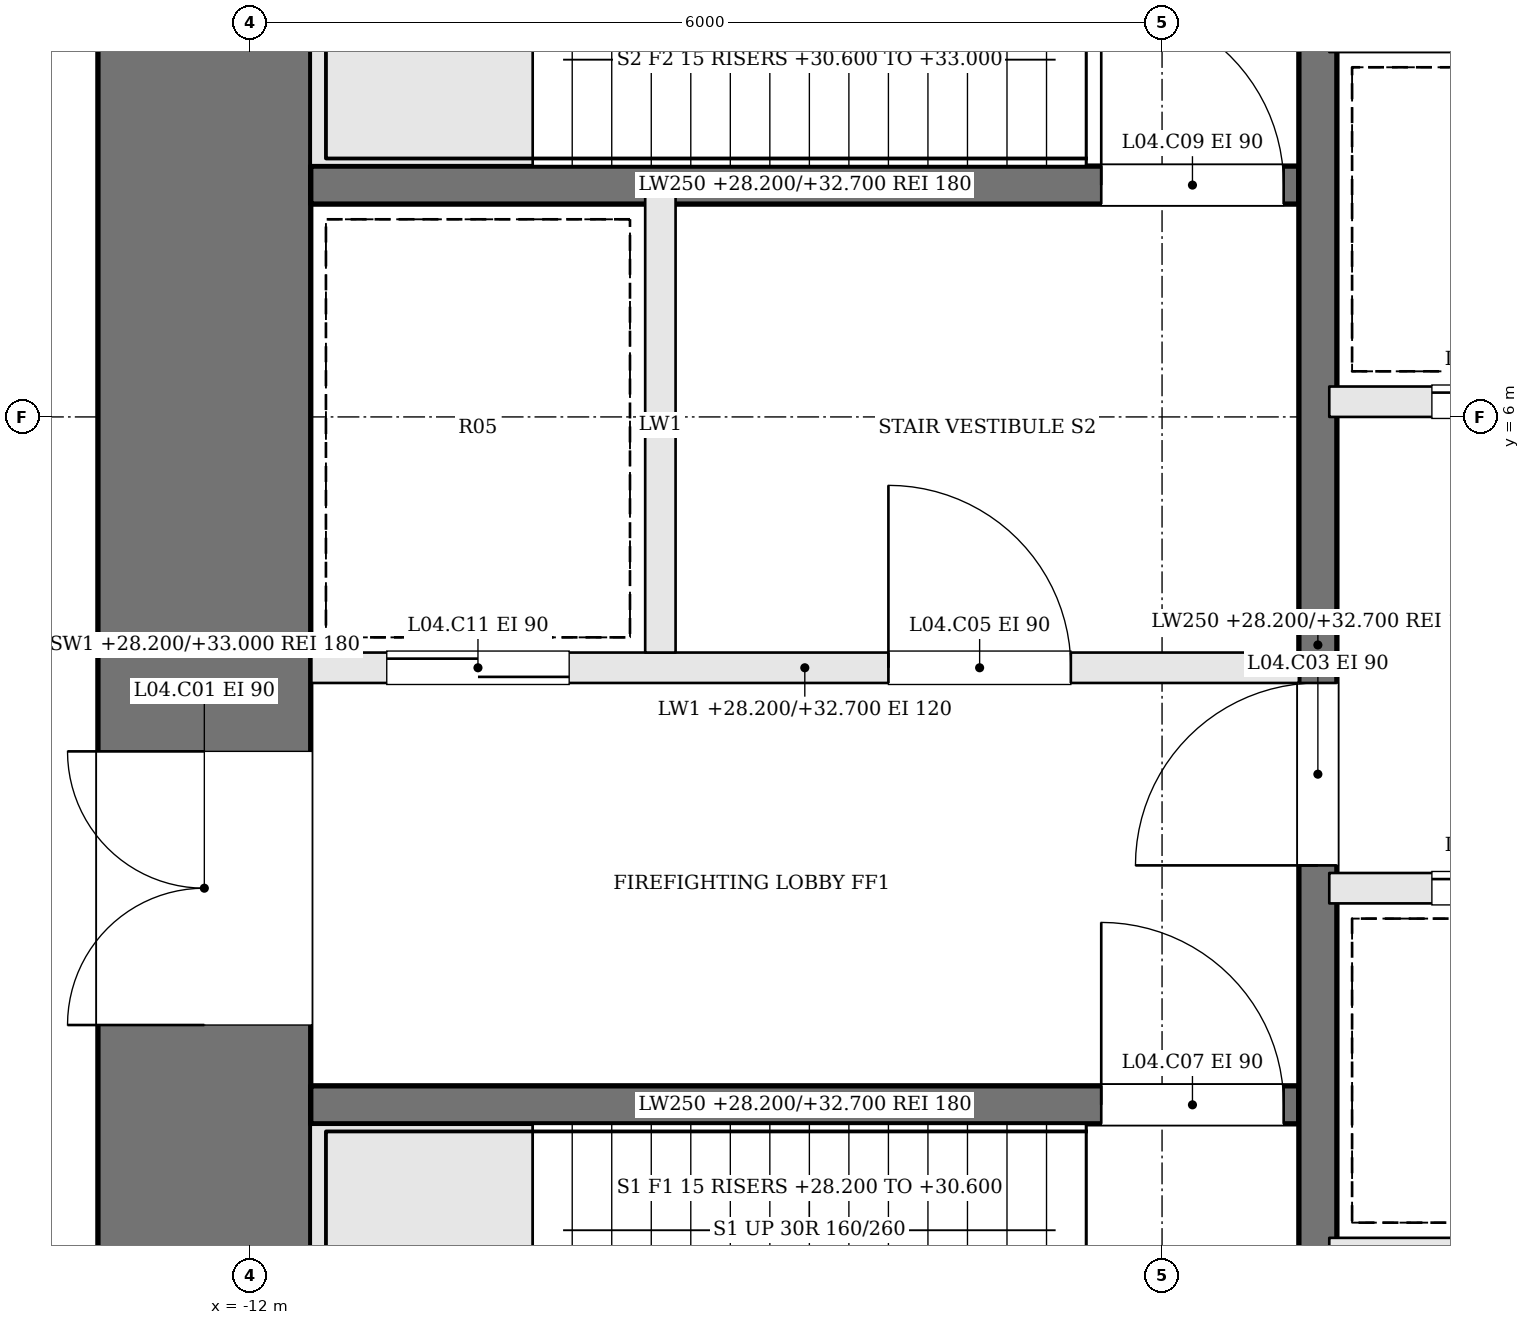
"""IFC4 building model, lengths in metres.
Left out: names, types, materials, properties, quantities, classifications, styles, units other than length and angle.
Written with IfcOpenShell. Run it as: python <this file> out.ifc"""

import sys

from ifc_helpers import new_model, si_unit, direction, frame, frame_2d, origin, place, context, subcontext, project, spatial, rectangle, extrude, element, fill, save


model = new_model("IFC4")
c1 = context("Model", 3, precision=1e-05, world=origin(), true_north=direction((0.0, 1.0)))
c2 = subcontext(c1, "Body", "Model", "MODEL_VIEW")
j1 = project(units=[si_unit("LENGTHUNIT", "METRE"), si_unit("PLANEANGLEUNIT", "RADIAN")], contexts=[c1])
p1 = place(None, origin())
s1 = spatial("IfcSite", under=j1, at=p1, CompositionType="ELEMENT")
p2 = place(p1, origin())
s2 = spatial("IfcBuilding", under=s1, at=p2, CompositionType="ELEMENT")
p3 = place(p2, frame((0.0, 0.0, 28.2)))
s3 = spatial("IfcBuildingStorey", under=s2, at=p3, CompositionType="ELEMENT", Elevation=28.2)
p4 = place(p3, frame((-12.3, -1.6, 0.0), z_axis=(0.0, 0.0, 1.0), x_axis=(0.0, 1.0, 0.0)))
e1 = element("IfcWall", 1, at=p4, inside=s3, PredefinedType="SHEAR", context=c2, shape_type="SweptSolid", body=[
    extrude(rectangle(XDim=12.2, YDim=1.4, at=frame_2d((6.1, 0.0))), origin(), (0.0, 0.0, 1.0), 4.8),
])
p5 = place(p4, frame((3.6, 0.0, 0.0)))
e2 = element("IfcOpeningElement", 2, at=p5, cuts=e1, PredefinedType="OPENING", context=c2, shape_type="SweptSolid", body=[
    extrude(rectangle(XDim=1.8, YDim=2.1, at=frame_2d((0.9, 1.05))), frame((0.0, 0.71, 0.0), z_axis=(0.0, -1.0, 0.0), x_axis=(1.0, 0.0, 0.0)), (0.0, 0.0, 1.0), 1.42),
])
p6 = place(p3, frame((-11.6, 1.475, 0.0), z_axis=(0.0, 0.0, 1.0), x_axis=(1.0, 0.0, 0.0)))
e3 = element("IfcWall", 3, at=p6, inside=s3, PredefinedType="SOLIDWALL", context=c2, shape_type="SweptSolid", body=[
    extrude(rectangle(XDim=6.5, YDim=0.25, at=frame_2d((3.25, 0.0))), origin(), (0.0, 0.0, 1.0), 4.5),
])
p7 = place(p6, frame((5.2, 0.0, 0.0)))
e4 = element("IfcOpeningElement", 4, at=p7, cuts=e3, PredefinedType="OPENING", context=c2, shape_type="SweptSolid", body=[
    extrude(rectangle(XDim=1.2, YDim=2.1, at=frame_2d((0.6, 1.05))), frame((0.0, 0.135, 0.0), z_axis=(0.0, -1.0, 0.0), x_axis=(1.0, 0.0, 0.0)), (0.0, 0.0, 1.0), 0.27),
])
p8 = place(p3, frame((-11.6, 4.35, 0.0), z_axis=(0.0, 0.0, 1.0), x_axis=(1.0, 0.0, 0.0)))
e5 = element("IfcWall", 5, at=p8, inside=s3, PredefinedType="SOLIDWALL", context=c2, shape_type="SweptSolid", body=[
    extrude(rectangle(XDim=6.5, YDim=0.2, at=frame_2d((3.25, 0.0))), origin(), (0.0, 0.0, 1.0), 4.5),
])
p9 = place(p8, frame((3.8, 0.0, 0.0)))
e6 = element("IfcOpeningElement", 6, at=p9, cuts=e5, PredefinedType="OPENING", context=c2, shape_type="SweptSolid", body=[
    extrude(rectangle(XDim=1.2, YDim=2.1, at=frame_2d((0.6, 1.05))), frame((0.0, 0.11, 0.0), z_axis=(0.0, -1.0, 0.0), x_axis=(1.0, 0.0, 0.0)), (0.0, 0.0, 1.0), 0.22),
])
p10 = place(p8, frame((0.5, 0.0, 0.0)))
e7 = element("IfcOpeningElement", 7, at=p10, cuts=e5, PredefinedType="OPENING", context=c2, shape_type="SweptSolid", body=[
    extrude(rectangle(XDim=1.2, YDim=2.1, at=frame_2d((0.6, 1.05))), frame((0.0, 0.11, 0.0), z_axis=(0.0, -1.0, 0.0), x_axis=(1.0, 0.0, 0.0)), (0.0, 0.0, 1.0), 0.22),
])
p11 = place(p3, frame((-11.6, 7.525, 0.0), z_axis=(0.0, 0.0, 1.0), x_axis=(1.0, 0.0, 0.0)))
e8 = element("IfcWall", 8, at=p11, inside=s3, PredefinedType="SOLIDWALL", context=c2, shape_type="SweptSolid", body=[
    extrude(rectangle(XDim=6.5, YDim=0.25, at=frame_2d((3.25, 0.0))), origin(), (0.0, 0.0, 1.0), 4.5),
])
p12 = place(p11, frame((5.2, 0.0, 0.0)))
e9 = element("IfcOpeningElement", 9, at=p12, cuts=e8, PredefinedType="OPENING", context=c2, shape_type="SweptSolid", body=[
    extrude(rectangle(XDim=1.2, YDim=2.1, at=frame_2d((0.6, 1.05))), frame((0.0, 0.135, 0.0), z_axis=(0.0, -1.0, 0.0), x_axis=(1.0, 0.0, 0.0)), (0.0, 0.0, 1.0), 0.27),
])
p13 = place(p3, frame((-9.3, 4.45, 0.0), z_axis=(0.0, 0.0, 1.0), x_axis=(0.0, 1.0, 0.0)))
e10 = element("IfcWall", 10, at=p13, inside=s3, PredefinedType="SOLIDWALL", context=c2, shape_type="SweptSolid", body=[
    extrude(rectangle(XDim=3.0, YDim=0.2, at=frame_2d((1.5, 0.0))), origin(), (0.0, 0.0, 1.0), 4.5),
])
p14 = place(p3, frame((-4.975, -1.6, 0.0), z_axis=(0.0, 0.0, 1.0), x_axis=(0.0, 1.0, 0.0)))
e11 = element("IfcWall", 11, at=p14, inside=s3, PredefinedType="SOLIDWALL", context=c2, shape_type="SweptSolid", body=[
    extrude(rectangle(XDim=12.2, YDim=0.25, at=frame_2d((6.1, 0.0))), origin(), (0.0, 0.0, 1.0), 4.5),
])
p15 = place(p14, frame((4.65, 0.0, 0.0)))
e12 = element("IfcOpeningElement", 12, at=p15, cuts=e11, PredefinedType="OPENING", context=c2, shape_type="SweptSolid", body=[
    extrude(rectangle(XDim=1.2, YDim=2.1, at=frame_2d((0.6, 1.05))), frame((0.0, 0.135, 0.0), z_axis=(0.0, -1.0, 0.0), x_axis=(1.0, 0.0, 0.0)), (0.0, 0.0, 1.0), 0.27),
])
p16 = place(p3, frame((-4.9, 0.5, 0.0), z_axis=(0.0, 0.0, 1.0), x_axis=(1.0, 0.0, 0.0)))
e13 = element("IfcWall", 13, at=p16, inside=s3, PredefinedType="SOLIDWALL", context=c2, shape_type="SweptSolid", body=[
    extrude(rectangle(XDim=9.8, YDim=0.2, at=frame_2d((4.9, 0.0))), origin(), (0.0, 0.0, 1.0), 4.5),
])
p17 = place(p3, frame((-4.9, 2.9, 0.0), z_axis=(0.0, 0.0, 1.0), x_axis=(1.0, 0.0, 0.0)))
e14 = element("IfcWall", 14, at=p17, inside=s3, PredefinedType="SOLIDWALL", context=c2, shape_type="SweptSolid", body=[
    extrude(rectangle(XDim=9.8, YDim=0.2, at=frame_2d((4.9, 0.0))), origin(), (0.0, 0.0, 1.0), 4.5),
])
p18 = place(p17, frame((0.675, 0.0, 0.0)))
e15 = element("IfcOpeningElement", 15, at=p18, cuts=e14, PredefinedType="OPENING", context=c2, shape_type="SweptSolid", body=[
    extrude(rectangle(XDim=1.1, YDim=2.1, at=frame_2d((0.55, 1.05))), frame((0.0, 0.11, 0.0), z_axis=(0.0, -1.0, 0.0), x_axis=(1.0, 0.0, 0.0)), (0.0, 0.0, 1.0), 0.22),
])
p19 = place(p17, frame((3.125, 0.0, 0.0)))
e16 = element("IfcOpeningElement", 16, at=p19, cuts=e14, PredefinedType="OPENING", context=c2, shape_type="SweptSolid", body=[
    extrude(rectangle(XDim=1.1, YDim=2.1, at=frame_2d((0.55, 1.05))), frame((0.0, 0.11, 0.0), z_axis=(0.0, -1.0, 0.0), x_axis=(1.0, 0.0, 0.0)), (0.0, 0.0, 1.0), 0.22),
])
p20 = place(p3, frame((-4.9, 6.1, 0.0), z_axis=(0.0, 0.0, 1.0), x_axis=(1.0, 0.0, 0.0)))
e17 = element("IfcWall", 17, at=p20, inside=s3, PredefinedType="SOLIDWALL", context=c2, shape_type="SweptSolid", body=[
    extrude(rectangle(XDim=9.8, YDim=0.2, at=frame_2d((4.9, 0.0))), origin(), (0.0, 0.0, 1.0), 4.5),
])
p21 = place(p20, frame((0.675, 0.0, 0.0)))
e18 = element("IfcOpeningElement", 18, at=p21, cuts=e17, PredefinedType="OPENING", context=c2, shape_type="SweptSolid", body=[
    extrude(rectangle(XDim=1.1, YDim=2.1, at=frame_2d((0.55, 1.05))), frame((0.0, 0.11, 0.0), z_axis=(0.0, -1.0, 0.0), x_axis=(1.0, 0.0, 0.0)), (0.0, 0.0, 1.0), 0.22),
])
p22 = place(p20, frame((3.125, 0.0, 0.0)))
e19 = element("IfcOpeningElement", 19, at=p22, cuts=e17, PredefinedType="OPENING", context=c2, shape_type="SweptSolid", body=[
    extrude(rectangle(XDim=1.1, YDim=2.1, at=frame_2d((0.55, 1.05))), frame((0.0, 0.11, 0.0), z_axis=(0.0, -1.0, 0.0), x_axis=(1.0, 0.0, 0.0)), (0.0, 0.0, 1.0), 0.22),
])
p23 = place(p20, frame((5.575, 0.0, 0.0)))
e20 = element("IfcOpeningElement", 20, at=p23, cuts=e17, PredefinedType="OPENING", context=c2, shape_type="SweptSolid", body=[
    extrude(rectangle(XDim=1.1, YDim=2.1, at=frame_2d((0.55, 1.05))), frame((0.0, 0.11, 0.0), z_axis=(0.0, -1.0, 0.0), x_axis=(1.0, 0.0, 0.0)), (0.0, 0.0, 1.0), 0.22),
])
p24 = place(p20, frame((8.025, 0.0, 0.0)))
e21 = element("IfcOpeningElement", 21, at=p24, cuts=e17, PredefinedType="OPENING", context=c2, shape_type="SweptSolid", body=[
    extrude(rectangle(XDim=1.1, YDim=2.1, at=frame_2d((0.55, 1.05))), frame((0.0, 0.11, 0.0), z_axis=(0.0, -1.0, 0.0), x_axis=(1.0, 0.0, 0.0)), (0.0, 0.0, 1.0), 0.22),
])
p25 = place(p5, origin())
e22 = element("IfcDoor", 22, at=p25, inside=s3, OperationType="DOUBLE_DOOR_SINGLE_SWING", PredefinedType="DOOR", context=c2, shape_type="SweptSolid", body=[
    extrude(rectangle(XDim=1.8, YDim=2.1, at=frame_2d((0.9, 1.05))), frame((0.0, 0.025, 0.0), z_axis=(0.0, -1.0, 0.0), x_axis=(1.0, 0.0, 0.0)), (0.0, 0.0, 1.0), 0.05),
])
fill(e2, e22)
p26 = place(p15, origin())
e23 = element("IfcDoor", 23, at=p26, inside=s3, OperationType="SINGLE_SWING_LEFT", PredefinedType="DOOR", context=c2, shape_type="SweptSolid", body=[
    extrude(rectangle(XDim=1.2, YDim=2.1, at=frame_2d((0.6, 1.05))), frame((0.0, 0.025, 0.0), z_axis=(0.0, -1.0, 0.0), x_axis=(1.0, 0.0, 0.0)), (0.0, 0.0, 1.0), 0.05),
])
fill(e12, e23)
p27 = place(p9, origin())
e24 = element("IfcDoor", 24, at=p27, inside=s3, OperationType="SINGLE_SWING_LEFT", PredefinedType="DOOR", context=c2, shape_type="SweptSolid", body=[
    extrude(rectangle(XDim=1.2, YDim=2.1, at=frame_2d((0.6, 1.05))), frame((0.0, 0.025, 0.0), z_axis=(0.0, -1.0, 0.0), x_axis=(1.0, 0.0, 0.0)), (0.0, 0.0, 1.0), 0.05),
])
fill(e6, e24)
p28 = place(p7, origin())
e25 = element("IfcDoor", 25, at=p28, inside=s3, OperationType="SINGLE_SWING_LEFT", PredefinedType="DOOR", context=c2, shape_type="SweptSolid", body=[
    extrude(rectangle(XDim=1.2, YDim=2.1, at=frame_2d((0.6, 1.05))), frame((0.0, 0.025, 0.0), z_axis=(0.0, -1.0, 0.0), x_axis=(1.0, 0.0, 0.0)), (0.0, 0.0, 1.0), 0.05),
])
fill(e4, e25)
p29 = place(p12, origin())
e26 = element("IfcDoor", 26, at=p29, inside=s3, OperationType="SINGLE_SWING_LEFT", PredefinedType="DOOR", context=c2, shape_type="SweptSolid", body=[
    extrude(rectangle(XDim=1.2, YDim=2.1, at=frame_2d((0.6, 1.05))), frame((0.0, 0.025, 0.0), z_axis=(0.0, -1.0, 0.0), x_axis=(1.0, 0.0, 0.0)), (0.0, 0.0, 1.0), 0.05),
])
fill(e9, e26)
p30 = place(p10, origin())
e27 = element("IfcDoor", 27, at=p30, inside=s3, OperationType="SLIDING_TO_RIGHT", PredefinedType="DOOR", context=c2, shape_type="SweptSolid", body=[
    extrude(rectangle(XDim=1.2, YDim=2.1, at=frame_2d((0.6, 1.05))), frame((0.0, 0.025, 0.0), z_axis=(0.0, -1.0, 0.0), x_axis=(1.0, 0.0, 0.0)), (0.0, 0.0, 1.0), 0.05),
])
fill(e7, e27)
p31 = place(p18, origin())
e28 = element("IfcDoor", 28, at=p31, inside=s3, OperationType="SLIDING_TO_RIGHT", PredefinedType="DOOR", context=c2, shape_type="SweptSolid", body=[
    extrude(rectangle(XDim=1.1, YDim=2.1, at=frame_2d((0.55, 1.05))), frame((0.0, 0.025, 0.0), z_axis=(0.0, -1.0, 0.0), x_axis=(1.0, 0.0, 0.0)), (0.0, 0.0, 1.0), 0.05),
])
fill(e15, e28)
p32 = place(p21, origin())
e29 = element("IfcDoor", 29, at=p32, inside=s3, OperationType="SLIDING_TO_RIGHT", PredefinedType="DOOR", context=c2, shape_type="SweptSolid", body=[
    extrude(rectangle(XDim=1.1, YDim=2.1, at=frame_2d((0.55, 1.05))), frame((0.0, 0.025, 0.0), z_axis=(0.0, -1.0, 0.0), x_axis=(1.0, 0.0, 0.0)), (0.0, 0.0, 1.0), 0.05),
])
fill(e18, e29)
save(model, sys.argv[1])
